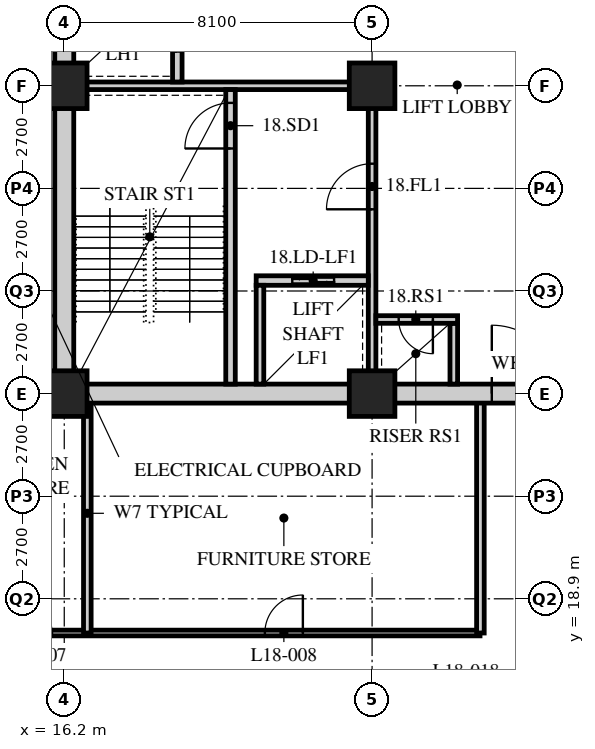
"""IFC4 building model, lengths in metres.
Left out: names, types, materials, properties, quantities, classifications, styles, units other than length and angle.
Written with IfcOpenShell. Run it as: python <this file> out.ifc"""

import sys

from ifc_helpers import new_model, si_unit, direction, frame, frame_2d, origin, origin_2d, place, context, subcontext, project, spatial, rectangle, hollow_rectangle, extrude, element, fill, save


model = new_model("IFC4")
c1 = context("Model", 3, precision=1e-05, world=origin(), true_north=direction((0.0, 1.0)))
c2 = subcontext(c1, "Body", "Model", "MODEL_VIEW")
j1 = project(units=[si_unit("LENGTHUNIT", "METRE"), si_unit("PLANEANGLEUNIT", "RADIAN")], contexts=[c1])
p1 = place(None, origin())
s1 = spatial("IfcSite", under=j1, at=p1, CompositionType="ELEMENT")
p2 = place(p1, origin())
s2 = spatial("IfcBuilding", under=s1, at=p2, CompositionType="ELEMENT")
p3 = place(p2, frame((0.0, 0.0, 73.8)))
s3 = spatial("IfcBuildingStorey", under=s2, at=p3, CompositionType="ELEMENT", Elevation=73.8)
for number, where, z_axis, x_axis in (
    (1, (16.2, 24.3, 0.0), (0.0, 0.0, 1.0), (1.0, 0.0, 0.0)),
    (2, (16.2, 32.4, 0.0), (0.0, 0.0, 1.0), (1.0, 0.0, 0.0)),
    (3, (24.3, 24.3, 0.0), (0.0, 0.0, 1.0), (1.0, 0.0, 0.0)),
    (4, (24.3, 32.4, 0.0), (0.0, 0.0, 1.0), (1.0, 0.0, 0.0)),
):
    element("IfcColumn", number, at=place(p3, frame(where, z_axis=z_axis, x_axis=x_axis)), inside=s3, PredefinedType="COLUMN", context=c2, shape_type="SweptSolid", body=[
        extrude(hollow_rectangle(XDim=1.2, YDim=1.2, WallThickness=0.12, at=origin_2d()), origin(), (0.0, 0.0, 1.0), 3.4),
    ])
p4 = place(p3, frame((13.95, 18.0, 0.0), z_axis=(0.0, 0.0, 1.0), x_axis=(1.0, 0.0, 0.0)))
e5 = element("IfcWall", 5, at=p4, inside=s3, PredefinedType="PARTITIONING", context=c2, shape_type="SweptSolid", body=[
    extrude(rectangle(XDim=13.19, YDim=0.15, at=frame_2d((6.595, 0.0))), origin(), (0.0, 0.0, 1.0), 3.19),
])
p5 = place(p4, frame((0.929, 0.0, 0.0)))
e6 = element("IfcOpeningElement", 6, at=p5, cuts=e5, PredefinedType="OPENING", context=c2, shape_type="SweptSolid", body=[
    extrude(rectangle(XDim=1.0, YDim=2.1, at=frame_2d((0.5, 1.05))), frame((0.0, 0.085, 0.0), z_axis=(0.0, -1.0, 0.0), x_axis=(1.0, 0.0, 0.0)), (0.0, 0.0, 1.0), 0.17),
])
p6 = place(p4, frame((7.529, 0.0, 0.0)))
e7 = element("IfcOpeningElement", 7, at=p6, cuts=e5, PredefinedType="OPENING", context=c2, shape_type="SweptSolid", body=[
    extrude(rectangle(XDim=1.0, YDim=2.1, at=frame_2d((0.5, 1.05))), frame((0.0, 0.085, 0.0), z_axis=(0.0, -1.0, 0.0), x_axis=(1.0, 0.0, 0.0)), (0.0, 0.0, 1.0), 0.17),
])
p7 = place(p3, frame((13.95, 32.4, 0.0), z_axis=(0.0, 0.0, 1.0), x_axis=(1.0, 0.0, 0.0)))
e8 = element("IfcWall", 8, at=p7, inside=s3, PredefinedType="SOLIDWALL", context=c2, shape_type="SweptSolid", body=[
    extrude(rectangle(XDim=2.25, YDim=0.2, at=frame_2d((1.125, 0.0))), origin(), (0.0, 0.0, 1.0), 2.578),
])
for number, where, z_axis, x_axis in (
    (9, (16.807, 18.0, 0.0), (0.0, 0.0, 1.0), (0.0, 1.0, 0.0)),
    (10, (27.15, 18.0, 0.0), (0.0, 0.0, 1.0), (0.0, 1.0, 0.0)),
):
    element("IfcWall", number, at=place(p3, frame(where, z_axis=z_axis, x_axis=x_axis)), inside=s3, PredefinedType="SOLIDWALL", context=c2, shape_type="SweptSolid", body=[
        extrude(rectangle(XDim=6.3, YDim=0.2, at=frame_2d((3.15, 0.0))), origin(), (0.0, 0.0, 1.0), 3.19),
    ])
p8 = place(p3, frame((13.95, 24.3, 0.0), z_axis=(0.0, 0.0, 1.0), x_axis=(1.0, 0.0, 0.0)))
e11 = element("IfcWall", 11, at=p8, inside=s3, PredefinedType="SOLIDWALL", context=c2, shape_type="SweptSolid", body=[
    extrude(rectangle(XDim=2.25, YDim=0.2, at=frame_2d((1.125, 0.0))), origin(), (0.0, 0.0, 1.0), 2.578),
])
p9 = place(p3, frame((15.95, 24.3, 0.0), z_axis=(0.0, 0.0, 1.0), x_axis=(1.0, 0.0, 0.0)))
e12 = element("IfcWall", 12, at=p9, inside=s3, PredefinedType="SOLIDWALL", context=c2, shape_type="SweptSolid", body=[
    extrude(rectangle(XDim=24.8, YDim=0.5, at=frame_2d((12.4, 0.0))), origin(), (0.0, 0.0, 1.0), 2.54),
])
p10 = place(p9, frame((11.5, 0.0, 0.0)))
e13 = element("IfcOpeningElement", 13, at=p10, cuts=e12, PredefinedType="OPENING", context=c2, shape_type="SweptSolid", body=[
    extrude(rectangle(XDim=1.8, YDim=2.4, at=frame_2d((0.9, 1.2))), frame((0.0, 0.26, 0.0), z_axis=(0.0, -1.0, 0.0), x_axis=(1.0, 0.0, 0.0)), (0.0, 0.0, 1.0), 0.52),
])
p11 = place(p3, frame((16.2, 24.55, 0.0), z_axis=(0.0, 0.0, 1.0), x_axis=(0.0, 1.0, 0.0)))
e14 = element("IfcWall", 14, at=p11, inside=s3, PredefinedType="SOLIDWALL", context=c2, shape_type="SweptSolid", body=[
    extrude(rectangle(XDim=15.7, YDim=0.5, at=frame_2d((7.85, 0.0))), origin(), (0.0, 0.0, 1.0), 2.578),
])
p12 = place(p3, frame((16.45, 32.4, 0.0), z_axis=(0.0, 0.0, 1.0), x_axis=(1.0, 0.0, 0.0)))
e15 = element("IfcWall", 15, at=p12, inside=s3, PredefinedType="SOLIDWALL", context=c2, shape_type="SweptSolid", body=[
    extrude(rectangle(XDim=7.95, YDim=0.2, at=frame_2d((3.975, 0.0))), origin(), (0.0, 0.0, 1.0), 2.578),
])
p13 = place(p3, frame((24.3, 24.55, 0.0), z_axis=(0.0, 0.0, 1.0), x_axis=(0.0, 1.0, 0.0)))
e16 = element("IfcWall", 16, at=p13, inside=s3, PredefinedType="SOLIDWALL", context=c2, shape_type="SweptSolid", body=[
    extrude(rectangle(XDim=7.75, YDim=0.2, at=frame_2d((3.875, 0.0))), origin(), (0.0, 0.0, 1.0), 2.578),
])
p14 = place(p13, frame((4.6, 0.0, 0.0)))
e17 = element("IfcOpeningElement", 17, at=p14, cuts=e16, PredefinedType="OPENING", context=c2, shape_type="SweptSolid", body=[
    extrude(rectangle(XDim=1.2, YDim=2.1, at=frame_2d((0.6, 1.05))), frame((0.0, 0.11, 0.0), z_axis=(0.0, -1.0, 0.0), x_axis=(1.0, 0.0, 0.0)), (0.0, 0.0, 1.0), 0.22),
])
p15 = place(p3, frame((20.575, 24.55, 0.0), z_axis=(0.0, 0.0, 1.0), x_axis=(0.0, 1.0, 0.0)))
e18 = element("IfcWall", 18, at=p15, inside=s3, PredefinedType="SOLIDWALL", context=c2, shape_type="SweptSolid", body=[
    extrude(rectangle(XDim=7.75, YDim=0.25, at=frame_2d((3.875, 0.0))), origin(), (0.0, 0.0, 1.0), 3.19),
])
p16 = place(p15, frame((6.2, 0.0, 0.0)))
e19 = element("IfcOpeningElement", 19, at=p16, cuts=e18, PredefinedType="OPENING", context=c2, shape_type="SweptSolid", body=[
    extrude(rectangle(XDim=1.2, YDim=2.1, at=frame_2d((0.6, 1.05))), frame((0.0, 0.135, 0.0), z_axis=(0.0, -1.0, 0.0), x_axis=(1.0, 0.0, 0.0)), (0.0, 0.0, 1.0), 0.27),
])
p17 = place(p3, frame((21.25, 27.275, 0.0), z_axis=(0.0, 0.0, 1.0), x_axis=(1.0, 0.0, 0.0)))
e20 = element("IfcWall", 20, at=p17, inside=s3, PredefinedType="SOLIDWALL", context=c2, shape_type="SweptSolid", body=[
    extrude(rectangle(XDim=2.95, YDim=0.25, at=frame_2d((1.475, 0.0))), origin(), (0.0, 0.0, 1.0), 3.19),
])
p18 = place(p17, frame((0.95, 0.0, 0.0)))
e21 = element("IfcOpeningElement", 21, at=p18, cuts=e20, PredefinedType="OPENING", context=c2, shape_type="SweptSolid", body=[
    extrude(rectangle(XDim=1.1, YDim=2.4, at=frame_2d((0.55, 1.2))), frame((0.0, 0.135, 0.0), z_axis=(0.0, -1.0, 0.0), x_axis=(1.0, 0.0, 0.0)), (0.0, 0.0, 1.0), 0.27),
])
p19 = place(p3, frame((21.35, 24.55, 0.0), z_axis=(0.0, 0.0, 1.0), x_axis=(0.0, 1.0, 0.0)))
e22 = element("IfcWall", 22, at=p19, inside=s3, PredefinedType="SOLIDWALL", context=c2, shape_type="SweptSolid", body=[
    extrude(rectangle(XDim=2.6, YDim=0.2, at=frame_2d((1.3, 0.0))), origin(), (0.0, 0.0, 1.0), 3.19),
])
p20 = place(p3, frame((19.175, 32.5, 0.0), z_axis=(0.0, 0.0, 1.0), x_axis=(0.0, 1.0, 0.0)))
e23 = element("IfcWall", 23, at=p20, inside=s3, PredefinedType="SOLIDWALL", context=c2, shape_type="SweptSolid", body=[
    extrude(rectangle(XDim=7.75, YDim=0.25, at=frame_2d((3.875, 0.0))), origin(), (0.0, 0.0, 1.0), 3.19),
])
p21 = place(p20, frame((0.8, 0.0, 0.0)))
e24 = element("IfcOpeningElement", 24, at=p21, cuts=e23, PredefinedType="OPENING", context=c2, shape_type="SweptSolid", body=[
    extrude(rectangle(XDim=1.1, YDim=2.4, at=frame_2d((0.55, 1.2))), frame((0.0, 0.135, 0.0), z_axis=(0.0, -1.0, 0.0), x_axis=(1.0, 0.0, 0.0)), (0.0, 0.0, 1.0), 0.27),
])
p22 = place(p20, frame((3.4, 0.0, 0.0)))
e25 = element("IfcOpeningElement", 25, at=p22, cuts=e23, PredefinedType="OPENING", context=c2, shape_type="SweptSolid", body=[
    extrude(rectangle(XDim=1.1, YDim=2.4, at=frame_2d((0.55, 1.2))), frame((0.0, 0.135, 0.0), z_axis=(0.0, -1.0, 0.0), x_axis=(1.0, 0.0, 0.0)), (0.0, 0.0, 1.0), 0.27),
])
p23 = place(p20, frame((6.0, 0.0, 0.0)))
e26 = element("IfcOpeningElement", 26, at=p23, cuts=e23, PredefinedType="OPENING", context=c2, shape_type="SweptSolid", body=[
    extrude(rectangle(XDim=1.1, YDim=2.4, at=frame_2d((0.55, 1.2))), frame((0.0, 0.135, 0.0), z_axis=(0.0, -1.0, 0.0), x_axis=(1.0, 0.0, 0.0)), (0.0, 0.0, 1.0), 0.27),
])
p24 = place(p3, frame((26.45, 24.55, 0.0), z_axis=(0.0, 0.0, 1.0), x_axis=(0.0, 1.0, 0.0)))
e27 = element("IfcWall", 27, at=p24, inside=s3, PredefinedType="SOLIDWALL", context=c2, shape_type="SweptSolid", body=[
    extrude(rectangle(XDim=1.6, YDim=0.2, at=frame_2d((0.8, 0.0))), origin(), (0.0, 0.0, 1.0), 3.19),
])
p25 = place(p3, frame((24.4, 26.25, 0.0), z_axis=(0.0, 0.0, 1.0), x_axis=(1.0, 0.0, 0.0)))
e28 = element("IfcWall", 28, at=p25, inside=s3, PredefinedType="SOLIDWALL", context=c2, shape_type="SweptSolid", body=[
    extrude(rectangle(XDim=2.15, YDim=0.2, at=frame_2d((1.075, 0.0))), origin(), (0.0, 0.0, 1.0), 3.19),
])
p26 = place(p25, frame((0.6, 0.0, 0.0)))
e29 = element("IfcOpeningElement", 29, at=p26, cuts=e28, PredefinedType="OPENING", context=c2, shape_type="SweptSolid", body=[
    extrude(rectangle(XDim=0.9, YDim=2.1, at=frame_2d((0.45, 1.05))), frame((0.0, 0.11, 0.0), z_axis=(0.0, -1.0, 0.0), x_axis=(1.0, 0.0, 0.0)), (0.0, 0.0, 1.0), 0.22),
])
p27 = place(p6, origin())
e30 = element("IfcDoor", 30, at=p27, inside=s3, OperationType="SINGLE_SWING_RIGHT", PredefinedType="DOOR", context=c2, shape_type="SweptSolid", body=[
    extrude(rectangle(XDim=1.0, YDim=2.1, at=frame_2d((0.5, 1.05))), frame((0.0, 0.025, 0.0), z_axis=(0.0, -1.0, 0.0), x_axis=(1.0, 0.0, 0.0)), (0.0, 0.0, 1.0), 0.05),
])
fill(e7, e30)
p28 = place(p16, origin())
e31 = element("IfcDoor", 31, at=p28, inside=s3, OperationType="SINGLE_SWING_LEFT", PredefinedType="DOOR", context=c2, shape_type="SweptSolid", body=[
    extrude(rectangle(XDim=1.2, YDim=2.1, at=frame_2d((0.6, 1.05))), frame((0.0, 0.025, 0.0), z_axis=(0.0, -1.0, 0.0), x_axis=(1.0, 0.0, 0.0)), (0.0, 0.0, 1.0), 0.05),
])
fill(e19, e31)
p29 = place(p14, origin())
e32 = element("IfcDoor", 32, at=p29, inside=s3, OperationType="SINGLE_SWING_LEFT", PredefinedType="DOOR", context=c2, shape_type="SweptSolid", body=[
    extrude(rectangle(XDim=1.2, YDim=2.1, at=frame_2d((0.6, 1.05))), frame((0.0, 0.025, 0.0), z_axis=(0.0, -1.0, 0.0), x_axis=(1.0, 0.0, 0.0)), (0.0, 0.0, 1.0), 0.05),
])
fill(e17, e32)
p30 = place(p26, origin())
e33 = element("IfcDoor", 33, at=p30, inside=s3, OperationType="SINGLE_SWING_LEFT", PredefinedType="DOOR", context=c2, shape_type="SweptSolid", body=[
    extrude(rectangle(XDim=0.9, YDim=2.1, at=frame_2d((0.45, 1.05))), frame((0.0, 0.025, 0.0), z_axis=(0.0, -1.0, 0.0), x_axis=(1.0, 0.0, 0.0)), (0.0, 0.0, 1.0), 0.05),
])
fill(e29, e33)
p31 = place(p18, origin())
e34 = element("IfcDoor", 34, at=p31, inside=s3, OperationType="DOUBLE_DOOR_SLIDING", PredefinedType="DOOR", context=c2, shape_type="SweptSolid", body=[
    extrude(rectangle(XDim=1.1, YDim=2.4, at=frame_2d((0.55, 1.2))), frame((0.0, 0.025, 0.0), z_axis=(0.0, -1.0, 0.0), x_axis=(1.0, 0.0, 0.0)), (0.0, 0.0, 1.0), 0.05),
])
fill(e21, e34)
p32 = place(p10, origin())
e35 = element("IfcDoor", 35, at=p32, inside=s3, OperationType="DOUBLE_DOOR_SINGLE_SWING", PredefinedType="DOOR", context=c2, shape_type="SweptSolid", body=[
    extrude(rectangle(XDim=1.8, YDim=2.4, at=frame_2d((0.9, 1.2))), frame((0.0, 0.025, 0.0), z_axis=(0.0, -1.0, 0.0), x_axis=(1.0, 0.0, 0.0)), (0.0, 0.0, 1.0), 0.05),
])
fill(e13, e35)
save(model, sys.argv[1])
